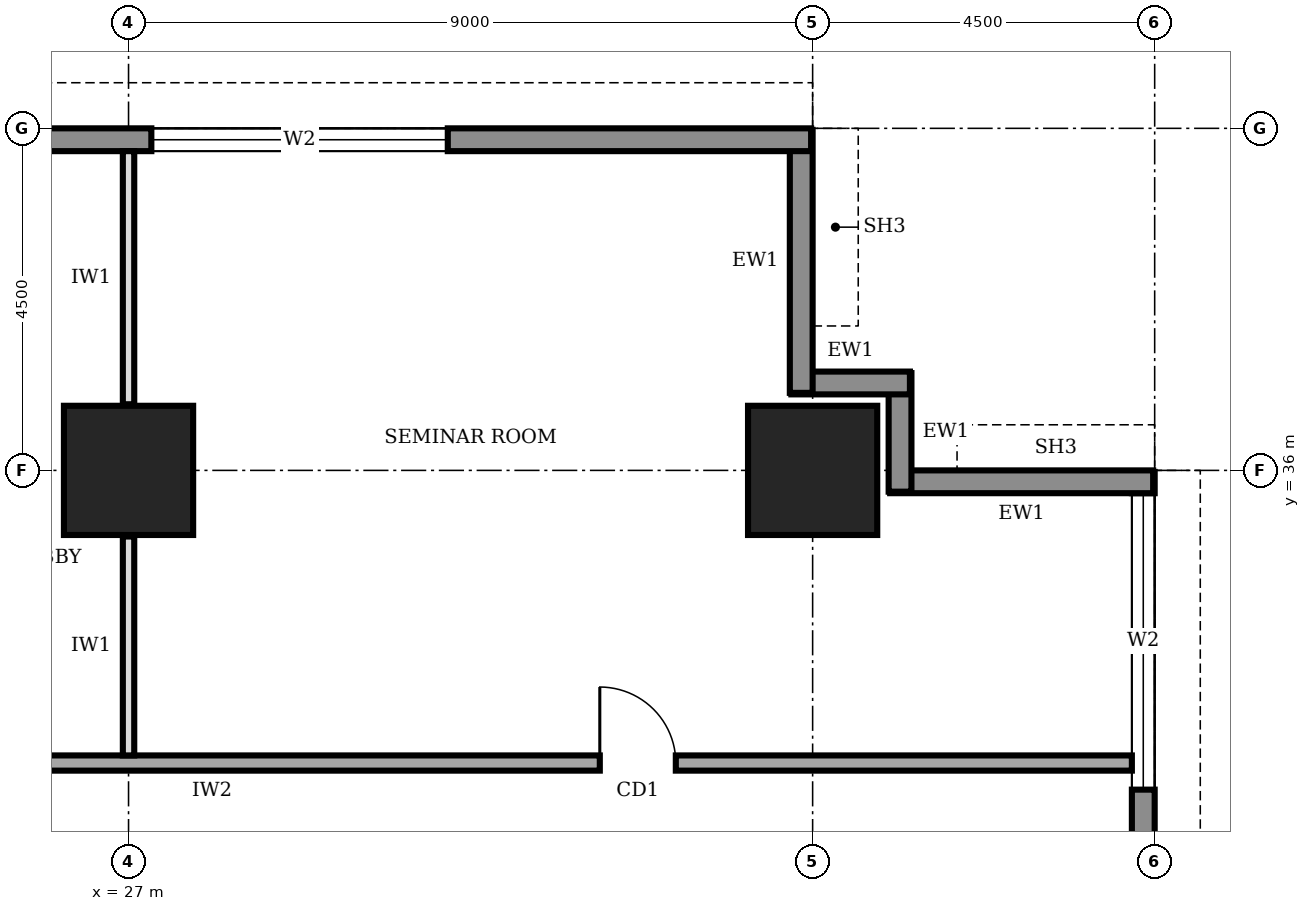
"""IFC4 building model, lengths in metres.
Left out: names, types, materials, properties, quantities, classifications, styles, units other than length and angle.
Written with IfcOpenShell. Run it as: python <this file> out.ifc"""

import sys

from ifc_helpers import new_model, si_unit, direction, frame, frame_2d, origin, origin_2d, place, context, subcontext, project, spatial, rectangle, extrude, element, fill, save


model = new_model("IFC4")
c1 = context("Model", 3, precision=1e-05, world=origin(), true_north=direction((0.0, 1.0)))
c2 = subcontext(c1, "Body", "Model", "MODEL_VIEW")
j1 = project(units=[si_unit("LENGTHUNIT", "METRE"), si_unit("PLANEANGLEUNIT", "RADIAN")], contexts=[c1])
p1 = place(None, origin())
s1 = spatial("IfcSite", under=j1, at=p1, CompositionType="ELEMENT")
p2 = place(p1, origin())
s2 = spatial("IfcBuilding", under=s1, at=p2, CompositionType="ELEMENT")
p3 = place(p2, frame((0.0, 0.0, 161.0)))
s3 = spatial("IfcBuildingStorey", under=s2, at=p3, CompositionType="ELEMENT", Elevation=161.0)
for number, where, z_axis, x_axis in (
    (1, (27.0, 36.0, 0.0), (0.0, 0.0, 1.0), (1.0, 0.0, 0.0)),
    (2, (36.0, 36.0, 0.0), (0.0, 0.0, 1.0), (1.0, 0.0, 0.0)),
):
    element("IfcColumn", number, at=place(p3, frame(where, z_axis=z_axis, x_axis=x_axis)), inside=s3, PredefinedType="COLUMN", context=c2, shape_type="SweptSolid", body=[
        extrude(rectangle(XDim=1.7, YDim=1.7, at=origin_2d()), origin(), (0.0, 0.0, 1.0), 4.0),
    ])
p4 = place(p3, frame((40.35, 4.52, 0.0), z_axis=(0.0, 0.0, 1.0), x_axis=(0.0, 1.0, 0.0)))
e3 = element("IfcWall", 3, at=p4, inside=s3, PredefinedType="STANDARD", context=c2, shape_type="SweptSolid", body=[
    extrude(rectangle(XDim=31.46, YDim=0.3, at=frame_2d((15.73, 0.0))), origin(), (0.0, 0.0, 1.0), 3.75),
])
p5 = place(p4, frame((4.78, 0.0, 0.6)))
e4 = element("IfcOpeningElement", 4, at=p5, cuts=e3, PredefinedType="OPENING", context=c2, shape_type="SweptSolid", body=[
    extrude(rectangle(XDim=3.9, YDim=2.6, at=frame_2d((1.95, 1.3))), frame((0.0, 0.16, 0.0), z_axis=(0.0, -1.0, 0.0), x_axis=(1.0, 0.0, 0.0)), (0.0, 0.0, 1.0), 0.32),
])
p6 = place(p4, frame((9.28, 0.0, 0.6)))
e5 = element("IfcOpeningElement", 5, at=p6, cuts=e3, PredefinedType="OPENING", context=c2, shape_type="SweptSolid", body=[
    extrude(rectangle(XDim=3.9, YDim=2.6, at=frame_2d((1.95, 1.3))), frame((0.0, 0.16, 0.0), z_axis=(0.0, -1.0, 0.0), x_axis=(1.0, 0.0, 0.0)), (0.0, 0.0, 1.0), 0.32),
])
p7 = place(p4, frame((13.78, 0.0, 0.6)))
e6 = element("IfcOpeningElement", 6, at=p7, cuts=e3, PredefinedType="OPENING", context=c2, shape_type="SweptSolid", body=[
    extrude(rectangle(XDim=3.9, YDim=2.6, at=frame_2d((1.95, 1.3))), frame((0.0, 0.16, 0.0), z_axis=(0.0, -1.0, 0.0), x_axis=(1.0, 0.0, 0.0)), (0.0, 0.0, 1.0), 0.32),
])
p8 = place(p4, frame((18.28, 0.0, 0.6)))
e7 = element("IfcOpeningElement", 7, at=p8, cuts=e3, PredefinedType="OPENING", context=c2, shape_type="SweptSolid", body=[
    extrude(rectangle(XDim=3.9, YDim=2.6, at=frame_2d((1.95, 1.3))), frame((0.0, 0.16, 0.0), z_axis=(0.0, -1.0, 0.0), x_axis=(1.0, 0.0, 0.0)), (0.0, 0.0, 1.0), 0.32),
])
p9 = place(p4, frame((22.78, 0.0, 0.6)))
e8 = element("IfcOpeningElement", 8, at=p9, cuts=e3, PredefinedType="OPENING", context=c2, shape_type="SweptSolid", body=[
    extrude(rectangle(XDim=3.9, YDim=2.6, at=frame_2d((1.95, 1.3))), frame((0.0, 0.16, 0.0), z_axis=(0.0, -1.0, 0.0), x_axis=(1.0, 0.0, 0.0)), (0.0, 0.0, 1.0), 0.32),
])
p10 = place(p4, frame((27.28, 0.0, 0.6)))
e9 = element("IfcOpeningElement", 9, at=p10, cuts=e3, PredefinedType="OPENING", context=c2, shape_type="SweptSolid", body=[
    extrude(rectangle(XDim=3.9, YDim=2.6, at=frame_2d((1.95, 1.3))), frame((0.0, 0.16, 0.0), z_axis=(0.0, -1.0, 0.0), x_axis=(1.0, 0.0, 0.0)), (0.0, 0.0, 1.0), 0.32),
])
p11 = place(p3, frame((40.48, 35.85, 0.0), z_axis=(0.0, 0.0, 1.0), x_axis=(-1.0, 0.0, 0.0)))
e10 = element("IfcWall", 10, at=p11, inside=s3, PredefinedType="STANDARD", context=c2, shape_type="SweptSolid", body=[
    extrude(rectangle(XDim=3.46, YDim=0.3, at=frame_2d((1.73, 0.0))), origin(), (0.0, 0.0, 1.0), 2.85),
])
for number, where, z_axis, x_axis in (
    (11, (37.15, 35.72, 0.0), (0.0, 0.0, 1.0), (0.0, 1.0, 0.0)),
    (12, (37.28, 37.15, 0.0), (0.0, 0.0, 1.0), (-1.0, 0.0, 0.0)),
):
    element("IfcWall", number, at=place(p3, frame(where, z_axis=z_axis, x_axis=x_axis)), inside=s3, PredefinedType="STANDARD", context=c2, shape_type="SweptSolid", body=[
        extrude(rectangle(XDim=1.56, YDim=0.3, at=frame_2d((0.78, 0.0))), origin(), (0.0, 0.0, 1.0), 3.75),
    ])
p12 = place(p3, frame((35.85, 37.02, 0.0), z_axis=(0.0, 0.0, 1.0), x_axis=(0.0, 1.0, 0.0)))
e13 = element("IfcWall", 13, at=p12, inside=s3, PredefinedType="STANDARD", context=c2, shape_type="SweptSolid", body=[
    extrude(rectangle(XDim=3.46, YDim=0.3, at=frame_2d((1.73, 0.0))), origin(), (0.0, 0.0, 1.0), 2.85),
])
p13 = place(p3, frame((35.98, 40.35, 0.0), z_axis=(0.0, 0.0, 1.0), x_axis=(-1.0, 0.0, 0.0)))
e14 = element("IfcWall", 14, at=p13, inside=s3, PredefinedType="STANDARD", context=c2, shape_type="SweptSolid", body=[
    extrude(rectangle(XDim=31.46, YDim=0.3, at=frame_2d((15.73, 0.0))), origin(), (0.0, 0.0, 1.0), 3.75),
])
p14 = place(p13, frame((27.28, 0.0, 0.6)))
e15 = element("IfcOpeningElement", 15, at=p14, cuts=e14, PredefinedType="OPENING", context=c2, shape_type="SweptSolid", body=[
    extrude(rectangle(XDim=3.9, YDim=2.6, at=frame_2d((1.95, 1.3))), frame((0.0, 0.16, 0.0), z_axis=(0.0, -1.0, 0.0), x_axis=(1.0, 0.0, 0.0)), (0.0, 0.0, 1.0), 0.32),
])
p15 = place(p13, frame((22.78, 0.0, 0.6)))
e16 = element("IfcOpeningElement", 16, at=p15, cuts=e14, PredefinedType="OPENING", context=c2, shape_type="SweptSolid", body=[
    extrude(rectangle(XDim=3.9, YDim=2.6, at=frame_2d((1.95, 1.3))), frame((0.0, 0.16, 0.0), z_axis=(0.0, -1.0, 0.0), x_axis=(1.0, 0.0, 0.0)), (0.0, 0.0, 1.0), 0.32),
])
p16 = place(p13, frame((4.78, 0.0, 0.6)))
e17 = element("IfcOpeningElement", 17, at=p16, cuts=e14, PredefinedType="OPENING", context=c2, shape_type="SweptSolid", body=[
    extrude(rectangle(XDim=3.9, YDim=2.6, at=frame_2d((1.95, 1.3))), frame((0.0, 0.16, 0.0), z_axis=(0.0, -1.0, 0.0), x_axis=(1.0, 0.0, 0.0)), (0.0, 0.0, 1.0), 0.32),
])
p17 = place(p3, frame((40.2, 32.15, 0.0), z_axis=(0.0, 0.0, 1.0), x_axis=(-1.0, 0.0, 0.0)))
e18 = element("IfcWall", 18, at=p17, inside=s3, PredefinedType="SOLIDWALL", context=c2, shape_type="SweptSolid", body=[
    extrude(rectangle(XDim=28.5, YDim=0.2, at=frame_2d((14.25, 0.0))), origin(), (0.0, 0.0, 1.0), 3.75),
])
p18 = place(p17, frame((27.2, 0.0, 0.0)))
e19 = element("IfcOpeningElement", 19, at=p18, cuts=e18, PredefinedType="OPENING", context=c2, shape_type="SweptSolid", body=[
    extrude(rectangle(XDim=1.0, YDim=2.1, at=frame_2d((0.5, 1.05))), frame((0.0, 0.11, 0.0), z_axis=(0.0, -1.0, 0.0), x_axis=(1.0, 0.0, 0.0)), (0.0, 0.0, 1.0), 0.22),
])
p19 = place(p17, frame((23.95, 0.0, 0.0)))
e20 = element("IfcOpeningElement", 20, at=p19, cuts=e18, PredefinedType="OPENING", context=c2, shape_type="SweptSolid", body=[
    extrude(rectangle(XDim=1.0, YDim=2.1, at=frame_2d((0.5, 1.05))), frame((0.0, 0.11, 0.0), z_axis=(0.0, -1.0, 0.0), x_axis=(1.0, 0.0, 0.0)), (0.0, 0.0, 1.0), 0.22),
])
p20 = place(p17, frame((17.2, 0.0, 0.0)))
e21 = element("IfcOpeningElement", 21, at=p20, cuts=e18, PredefinedType="OPENING", context=c2, shape_type="SweptSolid", body=[
    extrude(rectangle(XDim=1.0, YDim=2.1, at=frame_2d((0.5, 1.05))), frame((0.0, 0.11, 0.0), z_axis=(0.0, -1.0, 0.0), x_axis=(1.0, 0.0, 0.0)), (0.0, 0.0, 1.0), 0.22),
])
p21 = place(p17, frame((6.0, 0.0, 0.0)))
e22 = element("IfcOpeningElement", 22, at=p21, cuts=e18, PredefinedType="OPENING", context=c2, shape_type="SweptSolid", body=[
    extrude(rectangle(XDim=1.0, YDim=2.1, at=frame_2d((0.5, 1.05))), frame((0.0, 0.11, 0.0), z_axis=(0.0, -1.0, 0.0), x_axis=(1.0, 0.0, 0.0)), (0.0, 0.0, 1.0), 0.22),
])
p22 = place(p3, frame((27.0, 32.25, 0.0), z_axis=(0.0, 0.0, 1.0), x_axis=(0.0, 1.0, 0.0)))
e23 = element("IfcWall", 23, at=p22, inside=s3, PredefinedType="PARTITIONING", context=c2, shape_type="SweptSolid", body=[
    extrude(rectangle(XDim=2.88, YDim=0.15, at=frame_2d((1.44, 0.0))), origin(), (0.0, 0.0, 1.0), 2.85),
])
p23 = place(p3, frame((27.0, 36.87, 0.0), z_axis=(0.0, 0.0, 1.0), x_axis=(0.0, 1.0, 0.0)))
e24 = element("IfcWall", 24, at=p23, inside=s3, PredefinedType="PARTITIONING", context=c2, shape_type="SweptSolid", body=[
    extrude(rectangle(XDim=3.33, YDim=0.15, at=frame_2d((1.665, 0.0))), origin(), (0.0, 0.0, 1.0), 2.85),
])
p24 = place(p10, origin())
e25 = element("IfcWindow", 25, at=p24, inside=s3, PartitioningType="SINGLE_PANEL", PredefinedType="WINDOW", context=c2, shape_type="SweptSolid", body=[
    extrude(rectangle(XDim=3.9, YDim=2.6, at=frame_2d((1.95, 1.3))), frame((0.0, 0.03, 0.0), z_axis=(0.0, -1.0, 0.0), x_axis=(1.0, 0.0, 0.0)), (0.0, 0.0, 1.0), 0.06),
])
fill(e9, e25)
p25 = place(p16, origin())
e26 = element("IfcWindow", 26, at=p25, inside=s3, PartitioningType="SINGLE_PANEL", PredefinedType="WINDOW", context=c2, shape_type="SweptSolid", body=[
    extrude(rectangle(XDim=3.9, YDim=2.6, at=frame_2d((1.95, 1.3))), frame((0.0, 0.03, 0.0), z_axis=(0.0, -1.0, 0.0), x_axis=(1.0, 0.0, 0.0)), (0.0, 0.0, 1.0), 0.06),
])
fill(e17, e26)
p26 = place(p21, frame((1.0, 0.0, 0.0), z_axis=(0.0, 0.0, 1.0), x_axis=(-1.0, 0.0, 0.0)))
e27 = element("IfcDoor", 27, at=p26, inside=s3, OperationType="SINGLE_SWING_LEFT", PredefinedType="DOOR", context=c2, shape_type="SweptSolid", body=[
    extrude(rectangle(XDim=1.0, YDim=2.1, at=frame_2d((0.5, 1.05))), frame((0.0, 0.025, 0.0), z_axis=(0.0, -1.0, 0.0), x_axis=(1.0, 0.0, 0.0)), (0.0, 0.0, 1.0), 0.05),
])
fill(e22, e27)
save(model, sys.argv[1])
